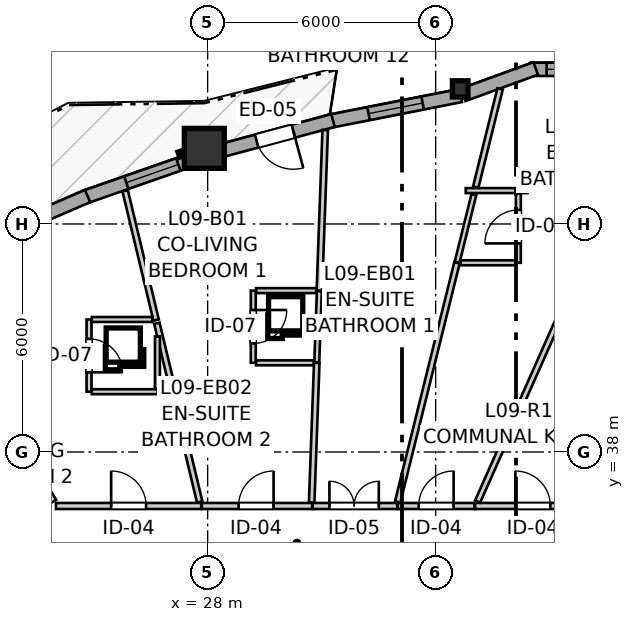
"""IFC4 building model, lengths in metres.
Left out: names, types, materials, properties, quantities, classifications, styles, units other than length and angle.
Written with IfcOpenShell. Run it as: python <this file> out.ifc"""

import sys

from ifc_helpers import new_model, si_unit, direction, frame, frame_2d, origin, origin_2d, place, context, subcontext, project, spatial, rectangle, i_section, extrude, source, transform, mapped, element, fill, save


model = new_model("IFC4")
c1 = context("Model", 3, precision=1e-05, world=origin(), true_north=direction((0.0, 1.0)))
c2 = subcontext(c1, "Body", "Model", "MODEL_VIEW")
j1 = project(units=[si_unit("LENGTHUNIT", "METRE"), si_unit("PLANEANGLEUNIT", "RADIAN")], contexts=[c1])
p1 = place(None, origin())
s1 = spatial("IfcSite", under=j1, at=p1, CompositionType="ELEMENT")
p2 = place(p1, origin())
s2 = spatial("IfcBuilding", under=s1, at=p2, CompositionType="ELEMENT")
p3 = place(p2, frame((0.0, 0.0, 33.4)))
s3 = spatial("IfcBuildingStorey", under=s2, at=p3, CompositionType="ELEMENT", Elevation=33.4)
m1 = source(origin(), c2, "Body", "SweptSolid", [
    extrude(i_section(OverallWidth=0.409, OverallDepth=0.425, WebThickness=0.03, FlangeThickness=0.048, FilletRadius=0.015, at=origin_2d()), origin(), (0.0, 0.0, 1.0), 2.94),
])
p4 = place(p3, frame((34.645, 47.555, 0.0), z_axis=(0.0, 0.0, 1.0), x_axis=(1.0, 0.0, 0.0)))
e1 = element("IfcColumn", 1, at=p4, inside=s3, PredefinedType="PILASTER", context=c2, shape_type="MappedRepresentation", body=[
    mapped(m1, transform((0.0, 0.0, 0.0), x_axis=(1.0, 0.0, 0.0), y_axis=(0.0, 1.0, 0.0), z_axis=(0.0, 0.0, 1.0), scale=1.0)),
])
m2 = source(origin(), c2, "Body", "SweptSolid", [
    extrude(rectangle(XDim=1.05, YDim=1.05, at=origin_2d()), origin(), (0.0, 0.0, 1.0), 2.94),
])
p5 = place(p3, frame((27.913, 45.99, 0.0), z_axis=(0.0, 0.0, 1.0), x_axis=(1.0, 0.0, 0.0)))
e2 = element("IfcColumn", 2, at=p5, inside=s3, PredefinedType="COLUMN", context=c2, shape_type="MappedRepresentation", body=[
    mapped(m2, transform((0.0, 0.0, 0.0), x_axis=(1.0, 0.0, 0.0), y_axis=(0.0, 1.0, 0.0), z_axis=(0.0, 0.0, 1.0), scale=1.0)),
])
p6 = place(p3, frame((38.59, 48.069, 0.0), z_axis=(0.0, 0.0, 1.0), x_axis=(-1.0, 0.0, 0.0)))
e3 = element("IfcWall", 3, at=p6, inside=s3, PredefinedType="SOLIDWALL", context=c2, shape_type="SweptSolid", body=[
    extrude(rectangle(XDim=2.09, YDim=0.35, at=frame_2d((1.045, 0.0))), origin(), (0.0, 0.0, 1.0), 2.42),
])
p7 = place(p6, frame((0.42, 0.0, 0.82)))
e4 = element("IfcOpeningElement", 4, at=p7, cuts=e3, PredefinedType="OPENING", context=c2, shape_type="SweptSolid", body=[
    extrude(rectangle(XDim=1.25, YDim=1.35, at=frame_2d((0.625, 0.675))), frame((0.0, 0.185, 0.0), z_axis=(0.0, -1.0, 0.0), x_axis=(1.0, 0.0, 0.0)), (0.0, 0.0, 1.0), 0.37),
])
p8 = place(p3, frame((36.633, 48.093, 0.0), z_axis=(0.0, 0.0, 1.0), x_axis=(-0.939691662178, -0.342022777067, 0.0)))
e5 = element("IfcWall", 5, at=p8, inside=s3, PredefinedType="SOLIDWALL", context=c2, shape_type="SweptSolid", body=[
    extrude(rectangle(XDim=2.032, YDim=0.35, at=frame_2d((1.016, 0.0))), origin(), (0.0, 0.0, 1.0), 2.42),
])
p9 = place(p3, frame((34.659, 47.38, 0.0), z_axis=(0.0, 0.0, 1.0), x_axis=(-0.981222284826, -0.19288034571, 0.0)))
e6 = element("IfcWall", 6, at=p9, inside=s3, PredefinedType="SOLIDWALL", context=c2, shape_type="SweptSolid", body=[
    extrude(rectangle(XDim=3.512, YDim=0.35, at=frame_2d((1.756, 0.0))), origin(), (0.0, 0.0, 1.0), 2.42),
])
p10 = place(p9, frame((1.021, 0.0, 0.82)))
e7 = element("IfcOpeningElement", 7, at=p10, cuts=e6, PredefinedType="OPENING", context=c2, shape_type="SweptSolid", body=[
    extrude(rectangle(XDim=1.45, YDim=1.25, at=frame_2d((0.725, 0.625))), frame((0.0, 0.185, 0.0), z_axis=(0.0, -1.0, 0.0), x_axis=(1.0, 0.0, 0.0)), (0.0, 0.0, 1.0), 0.37),
])
p11 = place(p3, frame((31.298, 46.722, 0.0), z_axis=(0.0, 0.0, 1.0), x_axis=(-0.965455913242, -0.260566459057, 0.0)))
e8 = element("IfcWall", 8, at=p11, inside=s3, PredefinedType="SOLIDWALL", context=c2, shape_type="SweptSolid", body=[
    extrude(rectangle(XDim=3.159, YDim=0.35, at=frame_2d((1.58, 0.0))), origin(), (0.0, 0.0, 1.0), 2.42),
])
p12 = place(p11, frame((1.08, 0.0, 0.0)))
e9 = element("IfcOpeningElement", 9, at=p12, cuts=e8, PredefinedType="OPENING", context=c2, shape_type="SweptSolid", body=[
    extrude(rectangle(XDim=1.0, YDim=2.1, at=frame_2d((0.5, 1.05))), frame((0.0, 0.185, 0.0), z_axis=(0.0, -1.0, 0.0), x_axis=(1.0, 0.0, 0.0)), (0.0, 0.0, 1.0), 0.37),
])
p13 = place(p3, frame((27.687, 45.726, 0.0), z_axis=(0.0, 0.0, 1.0), x_axis=(-0.9441205041, -0.329600475936, 0.0)))
e10 = element("IfcWall", 10, at=p13, inside=s3, PredefinedType="SOLIDWALL", context=c2, shape_type="SweptSolid", body=[
    extrude(rectangle(XDim=3.104, YDim=0.35, at=frame_2d((1.552, 0.0))), origin(), (0.0, 0.0, 1.0), 2.42),
])
p14 = place(p13, frame((0.486, 0.0, 0.82)))
e11 = element("IfcOpeningElement", 11, at=p14, cuts=e10, PredefinedType="OPENING", context=c2, shape_type="SweptSolid", body=[
    extrude(rectangle(XDim=1.45, YDim=1.25, at=frame_2d((0.725, 0.625))), frame((0.0, 0.185, 0.0), z_axis=(0.0, -1.0, 0.0), x_axis=(1.0, 0.0, 0.0)), (0.0, 0.0, 1.0), 0.37),
])
p15 = place(p3, frame((24.84, 44.735, 0.0), z_axis=(0.0, 0.0, 1.0), x_axis=(-0.917090935142, -0.398678086532, 0.0)))
e12 = element("IfcWall", 12, at=p15, inside=s3, PredefinedType="SOLIDWALL", context=c2, shape_type="SweptSolid", body=[
    extrude(rectangle(XDim=3.346, YDim=0.35, at=frame_2d((1.673, 0.0))), origin(), (0.0, 0.0, 1.0), 2.42),
])
p16 = place(p15, frame((1.108, 0.0, 0.82)))
e13 = element("IfcOpeningElement", 13, at=p16, cuts=e12, PredefinedType="OPENING", context=c2, shape_type="SweptSolid", body=[
    extrude(rectangle(XDim=1.15, YDim=1.2, at=frame_2d((0.575, 0.6))), frame((0.0, 0.185, 0.0), z_axis=(0.0, -1.0, 0.0), x_axis=(1.0, 0.0, 0.0)), (0.0, 0.0, 1.0), 0.37),
])
p17 = place(p3, frame((24.009, 36.58, 0.0), z_axis=(0.0, 0.0, 1.0), x_axis=(1.0, 0.0, 0.0)))
e14 = element("IfcWall", 14, at=p17, inside=s3, PredefinedType="PARTITIONING", context=c2, shape_type="SweptSolid", body=[
    extrude(rectangle(XDim=3.822, YDim=0.16, at=frame_2d((1.911, 0.0))), origin(), (0.0, 0.0, 1.0), 2.548),
])
p18 = place(p17, frame((1.452, 0.0, 0.0)))
e15 = element("IfcOpeningElement", 15, at=p18, cuts=e14, PredefinedType="OPENING", context=c2, shape_type="SweptSolid", body=[
    extrude(rectangle(XDim=0.92, YDim=2.1, at=frame_2d((0.46, 1.05))), frame((0.0, 0.09, 0.0), z_axis=(0.0, -1.0, 0.0), x_axis=(1.0, 0.0, 0.0)), (0.0, 0.0, 1.0), 0.18),
])
p19 = place(p3, frame((35.036, 36.58, 0.0), z_axis=(0.0, 0.0, 1.0), x_axis=(1.0, 0.0, 0.0)))
e16 = element("IfcWall", 16, at=p19, inside=s3, PredefinedType="PARTITIONING", context=c2, shape_type="SweptSolid", body=[
    extrude(rectangle(XDim=3.045, YDim=0.16, at=frame_2d((1.522, 0.0))), origin(), (0.0, 0.0, 1.0), 2.94),
])
p20 = place(p19, frame((1.062, 0.0, 0.0)))
e17 = element("IfcOpeningElement", 17, at=p20, cuts=e16, PredefinedType="OPENING", context=c2, shape_type="SweptSolid", body=[
    extrude(rectangle(XDim=0.92, YDim=2.1, at=frame_2d((0.46, 1.05))), frame((0.0, 0.09, 0.0), z_axis=(0.0, -1.0, 0.0), x_axis=(1.0, 0.0, 0.0)), (0.0, 0.0, 1.0), 0.18),
])
p21 = place(p3, frame((27.846, 36.58, 0.0), z_axis=(0.0, 0.0, 1.0), x_axis=(1.0, 0.0, 0.0)))
e18 = element("IfcWall", 18, at=p21, inside=s3, PredefinedType="PARTITIONING", context=c2, shape_type="SweptSolid", body=[
    extrude(rectangle(XDim=2.903, YDim=0.16, at=frame_2d((1.452, 0.0))), origin(), (0.0, 0.0, 1.0), 2.94),
])
p22 = place(p21, frame((0.969, 0.0, 0.0)))
e19 = element("IfcOpeningElement", 19, at=p22, cuts=e18, PredefinedType="OPENING", context=c2, shape_type="SweptSolid", body=[
    extrude(rectangle(XDim=0.92, YDim=2.1, at=frame_2d((0.46, 1.05))), frame((0.0, 0.09, 0.0), z_axis=(0.0, -1.0, 0.0), x_axis=(1.0, 0.0, 0.0)), (0.0, 0.0, 1.0), 0.18),
])
p23 = place(p3, frame((30.764, 36.58, 0.0), z_axis=(0.0, 0.0, 1.0), x_axis=(1.0, 0.0, 0.0)))
e20 = element("IfcWall", 20, at=p23, inside=s3, PredefinedType="PARTITIONING", context=c2, shape_type="SweptSolid", body=[
    extrude(rectangle(XDim=2.225, YDim=0.16, at=frame_2d((1.113, 0.0))), origin(), (0.0, 0.0, 1.0), 2.94),
])
p24 = place(p23, frame((0.44, 0.0, 0.0)))
e21 = element("IfcOpeningElement", 21, at=p24, cuts=e20, PredefinedType="OPENING", context=c2, shape_type="SweptSolid", body=[
    extrude(rectangle(XDim=1.3, YDim=2.1, at=frame_2d((0.65, 1.05))), frame((0.0, 0.09, 0.0), z_axis=(0.0, -1.0, 0.0), x_axis=(1.0, 0.0, 0.0)), (0.0, 0.0, 1.0), 0.18),
])
p25 = place(p3, frame((33.004, 36.58, 0.0), z_axis=(0.0, 0.0, 1.0), x_axis=(1.0, 0.0, 0.0)))
e22 = element("IfcWall", 22, at=p25, inside=s3, PredefinedType="PARTITIONING", context=c2, shape_type="SweptSolid", body=[
    extrude(rectangle(XDim=2.017, YDim=0.16, at=frame_2d((1.009, 0.0))), origin(), (0.0, 0.0, 1.0), 2.94),
])
p26 = place(p25, frame((0.549, 0.0, 0.0)))
e23 = element("IfcOpeningElement", 23, at=p26, cuts=e22, PredefinedType="OPENING", context=c2, shape_type="SweptSolid", body=[
    extrude(rectangle(XDim=0.92, YDim=2.1, at=frame_2d((0.46, 1.05))), frame((0.0, 0.09, 0.0), z_axis=(0.0, -1.0, 0.0), x_axis=(1.0, 0.0, 0.0)), (0.0, 0.0, 1.0), 0.18),
])
p27 = place(p3, frame((29.201, 42.247, 0.0), z_axis=(0.0, 0.0, 1.0), x_axis=(0.0, -1.0, 0.0)))
e24 = element("IfcWall", 24, at=p27, inside=s3, PredefinedType="PARTITIONING", context=c2, shape_type="SweptSolid", body=[
    extrude(rectangle(XDim=1.9, YDim=0.13, at=frame_2d((0.95, 0.0))), origin(), (0.0, 0.0, 1.0), 2.94),
])
p28 = place(p27, frame((0.51, 0.0, 0.0)))
e25 = element("IfcOpeningElement", 25, at=p28, cuts=e24, PredefinedType="OPENING", context=c2, shape_type="SweptSolid", body=[
    extrude(rectangle(XDim=0.88, YDim=2.05, at=frame_2d((0.44, 1.025))), frame((0.0, 0.075, 0.0), z_axis=(0.0, -1.0, 0.0), x_axis=(1.0, 0.0, 0.0)), (0.0, 0.0, 1.0), 0.15),
])
p29 = place(p3, frame((24.879, 41.487, 0.0), z_axis=(0.0, 0.0, 1.0), x_axis=(0.0, -1.0, 0.0)))
e26 = element("IfcWall", 26, at=p29, inside=s3, PredefinedType="PARTITIONING", context=c2, shape_type="SweptSolid", body=[
    extrude(rectangle(XDim=1.9, YDim=0.13, at=frame_2d((0.95, 0.0))), origin(), (0.0, 0.0, 1.0), 2.94),
])
p30 = place(p29, frame((0.51, 0.0, 0.0)))
e27 = element("IfcOpeningElement", 27, at=p30, cuts=e26, PredefinedType="OPENING", context=c2, shape_type="SweptSolid", body=[
    extrude(rectangle(XDim=0.88, YDim=2.05, at=frame_2d((0.44, 1.025))), frame((0.0, 0.075, 0.0), z_axis=(0.0, -1.0, 0.0), x_axis=(1.0, 0.0, 0.0)), (0.0, 0.0, 1.0), 0.15),
])
p31 = place(p3, frame((36.176, 42.979, 0.0), z_axis=(0.0, 0.0, 1.0), x_axis=(0.0, 1.0, 0.0)))
e28 = element("IfcWall", 28, at=p31, inside=s3, PredefinedType="PARTITIONING", context=c2, shape_type="SweptSolid", body=[
    extrude(rectangle(XDim=1.827, YDim=0.13, at=frame_2d((0.914, 0.0))), origin(), (0.0, 0.0, 1.0), 2.94),
])
p32 = place(p31, frame((0.51, 0.0, 0.0)))
e29 = element("IfcOpeningElement", 29, at=p32, cuts=e28, PredefinedType="OPENING", context=c2, shape_type="SweptSolid", body=[
    extrude(rectangle(XDim=0.88, YDim=2.05, at=frame_2d((0.44, 1.025))), frame((0.0, 0.075, 0.0), z_axis=(0.0, -1.0, 0.0), x_axis=(1.0, 0.0, 0.0)), (0.0, 0.0, 1.0), 0.15),
])
p33 = place(p3, frame((35.104, 36.697, 0.0), z_axis=(0.0, 0.0, 1.0), x_axis=(0.406121034368, 0.913819295837, 0.0)))
e30 = element("IfcWall", 30, at=p33, inside=s3, PredefinedType="PARTITIONING", context=c2, shape_type="SweptSolid", body=[
    extrude(rectangle(XDim=11.695, YDim=0.145, at=frame_2d((5.848, 0.0))), origin(), (0.0, 0.0, 1.0), 2.94),
])
p34 = place(p3, frame((20.481, 42.51, 0.0), z_axis=(0.0, 0.0, 1.0), x_axis=(0.513067331262, -0.858348363773, 0.0)))
e31 = element("IfcWall", 31, at=p34, inside=s3, PredefinedType="PARTITIONING", context=c2, shape_type="SweptSolid", body=[
    extrude(rectangle(XDim=6.765, YDim=0.145, at=frame_2d((3.382, 0.0))), origin(), (0.0, 0.0, 1.0), 2.94),
])
p35 = place(p3, frame((33.0, 36.685, 0.0), z_axis=(0.0, 0.0, 1.0), x_axis=(0.240736846637, 0.970590423748, 0.0)))
e32 = element("IfcWall", 32, at=p35, inside=s3, PredefinedType="PARTITIONING", context=c2, shape_type="SweptSolid", body=[
    extrude(rectangle(XDim=6.484, YDim=0.145, at=frame_2d((3.242, 0.0))), origin(), (0.0, 0.0, 1.0), 2.94),
])
p36 = place(p3, frame((26.664, 41.388, 0.0), z_axis=(0.0, 0.0, 1.0), x_axis=(0.233021630241, -0.972471552201, 0.0)))
e33 = element("IfcWall", 33, at=p36, inside=s3, PredefinedType="PARTITIONING", context=c2, shape_type="SweptSolid", body=[
    extrude(rectangle(XDim=4.836, YDim=0.145, at=frame_2d((2.418, 0.0))), origin(), (0.0, 0.0, 1.0), 2.94),
])
p37 = place(p3, frame((30.94, 42.247, 0.0), z_axis=(0.0, 0.0, 1.0), x_axis=(0.03624948077, 0.999342771597, 0.0)))
e34 = element("IfcWall", 34, at=p37, inside=s3, PredefinedType="PARTITIONING", context=c2, shape_type="SweptSolid", body=[
    extrude(rectangle(XDim=4.229, YDim=0.145, at=frame_2d((2.115, 0.0))), origin(), (0.0, 0.0, 1.0), 2.94),
])
p38 = place(p3, frame((30.737, 36.671, 0.0), z_axis=(0.0, 0.0, 1.0), x_axis=(0.036368539535, 0.999338445839, 0.0)))
e35 = element("IfcWall", 35, at=p38, inside=s3, PredefinedType="PARTITIONING", context=c2, shape_type="SweptSolid", body=[
    extrude(rectangle(XDim=3.679, YDim=0.145, at=frame_2d((1.839, 0.0))), origin(), (0.0, 0.0, 1.0), 2.94),
])
p39 = place(p3, frame((25.829, 44.875, 0.0), z_axis=(0.0, 0.0, 1.0), x_axis=(0.232921769711, -0.972495475154, 0.0)))
e36 = element("IfcWall", 36, at=p39, inside=s3, PredefinedType="PARTITIONING", context=c2, shape_type="SweptSolid", body=[
    extrude(rectangle(XDim=3.5, YDim=0.145, at=frame_2d((1.75, 0.0))), origin(), (0.0, 0.0, 1.0), 2.94),
])
p40 = place(p3, frame((35.054, 44.969, 0.0), z_axis=(0.0, 0.0, 1.0), x_axis=(0.240615617293, 0.970620484388, 0.0)))
e37 = element("IfcWall", 37, at=p40, inside=s3, PredefinedType="PARTITIONING", context=c2, shape_type="SweptSolid", body=[
    extrude(rectangle(XDim=2.664, YDim=0.145, at=frame_2d((1.332, 0.0))), origin(), (0.0, 0.0, 1.0), 2.94),
])
p41 = place(p3, frame((34.565, 42.994, 0.0), z_axis=(0.0, 0.0, 1.0), x_axis=(0.240658084914, 0.970609955732, 0.0)))
e38 = element("IfcWall", 38, at=p41, inside=s3, PredefinedType="PARTITIONING", context=c2, shape_type="SweptSolid", body=[
    extrude(rectangle(XDim=1.836, YDim=0.13, at=frame_2d((0.918, 0.0))), origin(), (0.0, 0.0, 1.0), 2.94),
])
p42 = place(p3, frame((30.872, 40.362, 0.0), z_axis=(0.0, 0.0, 1.0), x_axis=(0.036273279858, 0.999341908042, 0.0)))
e39 = element("IfcWall", 39, at=p42, inside=s3, PredefinedType="PARTITIONING", context=c2, shape_type="SweptSolid", body=[
    extrude(rectangle(XDim=1.871, YDim=0.13, at=frame_2d((0.936, 0.0))), origin(), (0.0, 0.0, 1.0), 2.94),
])
p43 = place(p3, frame((24.952, 39.587, 0.0), z_axis=(0.0, 0.0, 1.0), x_axis=(1.0, 0.0, 0.0)))
e40 = element("IfcWall", 40, at=p43, inside=s3, PredefinedType="PARTITIONING", context=c2, shape_type="SweptSolid", body=[
    extrude(rectangle(XDim=1.727, YDim=0.13, at=frame_2d((0.864, 0.0))), origin(), (0.0, 0.0, 1.0), 2.94),
])
p44 = place(p3, frame((24.952, 41.487, 0.0), z_axis=(0.0, 0.0, 1.0), x_axis=(1.0, 0.0, 0.0)))
e41 = element("IfcWall", 41, at=p44, inside=s3, PredefinedType="PARTITIONING", context=c2, shape_type="SweptSolid", body=[
    extrude(rectangle(XDim=1.59, YDim=0.13, at=frame_2d((0.795, 0.0))), origin(), (0.0, 0.0, 1.0), 2.508),
])
p45 = place(p3, frame((29.274, 42.247, 0.0), z_axis=(0.0, 0.0, 1.0), x_axis=(1.0, 0.0, 0.0)))
e42 = element("IfcWall", 42, at=p45, inside=s3, PredefinedType="PARTITIONING", context=c2, shape_type="SweptSolid", body=[
    extrude(rectangle(XDim=1.583, YDim=0.13, at=frame_2d((0.792, 0.0))), origin(), (0.0, 0.0, 1.0), 2.508),
])
p46 = place(p3, frame((26.679, 39.66, 0.0), z_axis=(0.0, 0.0, 1.0), x_axis=(0.0, 1.0, 0.0)))
e43 = element("IfcWall", 43, at=p46, inside=s3, PredefinedType="PARTITIONING", context=c2, shape_type="SweptSolid", body=[
    extrude(rectangle(XDim=1.38, YDim=0.13, at=frame_2d((0.69, 0.0))), origin(), (0.0, 0.0, 1.0), 2.94),
])
p47 = place(p3, frame((29.274, 40.347, 0.0), z_axis=(0.0, 0.0, 1.0), x_axis=(1.0, 0.0, 0.0)))
e44 = element("IfcWall", 44, at=p47, inside=s3, PredefinedType="PARTITIONING", context=c2, shape_type="SweptSolid", body=[
    extrude(rectangle(XDim=1.514, YDim=0.13, at=frame_2d((0.757, 0.0))), origin(), (0.0, 0.0, 1.0), 2.94),
])
p48 = place(p3, frame((34.66, 42.979, 0.0), z_axis=(0.0, 0.0, 1.0), x_axis=(1.0, 0.0, 0.0)))
e45 = element("IfcWall", 45, at=p48, inside=s3, PredefinedType="PARTITIONING", context=c2, shape_type="SweptSolid", body=[
    extrude(rectangle(XDim=1.443, YDim=0.13, at=frame_2d((0.722, 0.0))), origin(), (0.0, 0.0, 1.0), 2.94),
])
p49 = place(p3, frame((34.792, 44.879, 0.0), z_axis=(0.0, 0.0, 1.0), x_axis=(1.0, 0.0, 0.0)))
e46 = element("IfcWall", 46, at=p49, inside=s3, PredefinedType="PARTITIONING", context=c2, shape_type="SweptSolid", body=[
    extrude(rectangle(XDim=1.624, YDim=0.13, at=frame_2d((0.812, 0.0))), origin(), (0.0, 0.0, 1.0), 2.94),
])
m3 = source(origin(), c2, "Body", "SweptSolid", [
    extrude(rectangle(XDim=1.25, YDim=1.35, at=frame_2d((0.625, 0.675))), frame((0.0, 0.03, 0.0), z_axis=(0.0, -1.0, 0.0), x_axis=(1.0, 0.0, 0.0)), (0.0, 0.0, 1.0), 0.06),
])
p50 = place(p7, origin())
e47 = element("IfcWindow", 47, at=p50, inside=s3, PartitioningType="SINGLE_PANEL", PredefinedType="WINDOW", context=c2, shape_type="MappedRepresentation", body=[
    mapped(m3, transform((0.0, 0.0, 0.0), x_axis=(1.0, 0.0, 0.0), y_axis=(0.0, 1.0, 0.0), z_axis=(0.0, 0.0, 1.0), scale=1.0)),
])
fill(e4, e47)
m4 = source(origin(), c2, "Body", "SweptSolid", [
    extrude(rectangle(XDim=1.45, YDim=1.25, at=frame_2d((0.725, 0.625))), frame((0.0, 0.03, 0.0), z_axis=(0.0, -1.0, 0.0), x_axis=(1.0, 0.0, 0.0)), (0.0, 0.0, 1.0), 0.06),
])
p51 = place(p10, origin())
e48 = element("IfcWindow", 48, at=p51, inside=s3, PartitioningType="SINGLE_PANEL", PredefinedType="WINDOW", context=c2, shape_type="MappedRepresentation", body=[
    mapped(m4, transform((0.0, 0.0, 0.0), x_axis=(1.0, 0.0, 0.0), y_axis=(0.0, 1.0, 0.0), z_axis=(0.0, 0.0, 1.0), scale=1.0)),
])
fill(e7, e48)
p52 = place(p14, origin())
e49 = element("IfcWindow", 49, at=p52, inside=s3, PartitioningType="SINGLE_PANEL", PredefinedType="WINDOW", context=c2, shape_type="MappedRepresentation", body=[
    mapped(m4, transform((0.0, 0.0, 0.0), x_axis=(1.0, 0.0, 0.0), y_axis=(0.0, 1.0, 0.0), z_axis=(0.0, 0.0, 1.0), scale=1.0)),
])
fill(e11, e49)
m5 = source(origin(), c2, "Body", "SweptSolid", [
    extrude(rectangle(XDim=1.0, YDim=2.1, at=frame_2d((0.5, 1.05))), frame((0.0, 0.025, 0.0), z_axis=(0.0, -1.0, 0.0), x_axis=(1.0, 0.0, 0.0)), (0.0, 0.0, 1.0), 0.05),
])
p53 = place(p12, origin())
e50 = element("IfcDoor", 50, at=p53, inside=s3, OperationType="SINGLE_SWING_LEFT", PredefinedType="DOOR", context=c2, shape_type="MappedRepresentation", body=[
    mapped(m5, transform((0.0, 0.0, 0.0), x_axis=(1.0, 0.0, 0.0), y_axis=(0.0, 1.0, 0.0), z_axis=(0.0, 0.0, 1.0), scale=1.0)),
])
fill(e9, e50)
m6 = source(origin(), c2, "Body", "SweptSolid", [
    extrude(rectangle(XDim=0.92, YDim=2.1, at=frame_2d((0.46, 1.05))), frame((0.0, 0.025, 0.0), z_axis=(0.0, -1.0, 0.0), x_axis=(1.0, 0.0, 0.0)), (0.0, 0.0, 1.0), 0.05),
])
p54 = place(p18, origin())
e51 = element("IfcDoor", 51, at=p54, inside=s3, OperationType="SINGLE_SWING_LEFT", PredefinedType="DOOR", context=c2, shape_type="MappedRepresentation", body=[
    mapped(m6, transform((0.0, 0.0, 0.0), x_axis=(1.0, 0.0, 0.0), y_axis=(0.0, 1.0, 0.0), z_axis=(0.0, 0.0, 1.0), scale=1.0)),
])
fill(e15, e51)
p55 = place(p20, origin())
e52 = element("IfcDoor", 52, at=p55, inside=s3, OperationType="SINGLE_SWING_LEFT", PredefinedType="DOOR", context=c2, shape_type="MappedRepresentation", body=[
    mapped(m6, transform((0.0, 0.0, 0.0), x_axis=(1.0, 0.0, 0.0), y_axis=(0.0, 1.0, 0.0), z_axis=(0.0, 0.0, 1.0), scale=1.0)),
])
fill(e17, e52)
p56 = place(p22, origin())
e53 = element("IfcDoor", 53, at=p56, inside=s3, OperationType="SINGLE_SWING_RIGHT", PredefinedType="DOOR", context=c2, shape_type="MappedRepresentation", body=[
    mapped(m6, transform((0.0, 0.0, 0.0), x_axis=(1.0, 0.0, 0.0), y_axis=(0.0, 1.0, 0.0), z_axis=(0.0, 0.0, 1.0), scale=1.0)),
])
fill(e19, e53)
m7 = source(origin(), c2, "Body", "SweptSolid", [
    extrude(rectangle(XDim=1.3, YDim=2.1, at=frame_2d((0.65, 1.05))), frame((0.0, 0.025, 0.0), z_axis=(0.0, -1.0, 0.0), x_axis=(1.0, 0.0, 0.0)), (0.0, 0.0, 1.0), 0.05),
])
p57 = place(p24, origin())
e54 = element("IfcDoor", 54, at=p57, inside=s3, OperationType="DOUBLE_DOOR_SINGLE_SWING", PredefinedType="DOOR", context=c2, shape_type="MappedRepresentation", body=[
    mapped(m7, transform((0.0, 0.0, 0.0), x_axis=(1.0, 0.0, 0.0), y_axis=(0.0, 1.0, 0.0), z_axis=(0.0, 0.0, 1.0), scale=1.0)),
])
fill(e21, e54)
p58 = place(p26, origin())
e55 = element("IfcDoor", 55, at=p58, inside=s3, OperationType="SINGLE_SWING_RIGHT", PredefinedType="DOOR", context=c2, shape_type="MappedRepresentation", body=[
    mapped(m6, transform((0.0, 0.0, 0.0), x_axis=(1.0, 0.0, 0.0), y_axis=(0.0, 1.0, 0.0), z_axis=(0.0, 0.0, 1.0), scale=1.0)),
])
fill(e23, e55)
m8 = source(origin(), c2, "Body", "SweptSolid", [
    extrude(rectangle(XDim=0.88, YDim=2.05, at=frame_2d((0.44, 1.025))), frame((0.0, 0.025, 0.0), z_axis=(0.0, -1.0, 0.0), x_axis=(1.0, 0.0, 0.0)), (0.0, 0.0, 1.0), 0.05),
])
p59 = place(p28, origin())
e56 = element("IfcDoor", 56, at=p59, inside=s3, OperationType="SINGLE_SWING_LEFT", PredefinedType="DOOR", context=c2, shape_type="MappedRepresentation", body=[
    mapped(m8, transform((0.0, 0.0, 0.0), x_axis=(1.0, 0.0, 0.0), y_axis=(0.0, 1.0, 0.0), z_axis=(0.0, 0.0, 1.0), scale=1.0)),
])
fill(e25, e56)
p60 = place(p30, origin())
e57 = element("IfcDoor", 57, at=p60, inside=s3, OperationType="SINGLE_SWING_RIGHT", PredefinedType="DOOR", context=c2, shape_type="MappedRepresentation", body=[
    mapped(m8, transform((0.0, 0.0, 0.0), x_axis=(1.0, 0.0, 0.0), y_axis=(0.0, 1.0, 0.0), z_axis=(0.0, 0.0, 1.0), scale=1.0)),
])
fill(e27, e57)
p61 = place(p32, origin())
e58 = element("IfcDoor", 58, at=p61, inside=s3, OperationType="SINGLE_SWING_LEFT", PredefinedType="DOOR", context=c2, shape_type="MappedRepresentation", body=[
    mapped(m8, transform((0.0, 0.0, 0.0), x_axis=(1.0, 0.0, 0.0), y_axis=(0.0, 1.0, 0.0), z_axis=(0.0, 0.0, 1.0), scale=1.0)),
])
fill(e29, e58)
save(model, sys.argv[1])
